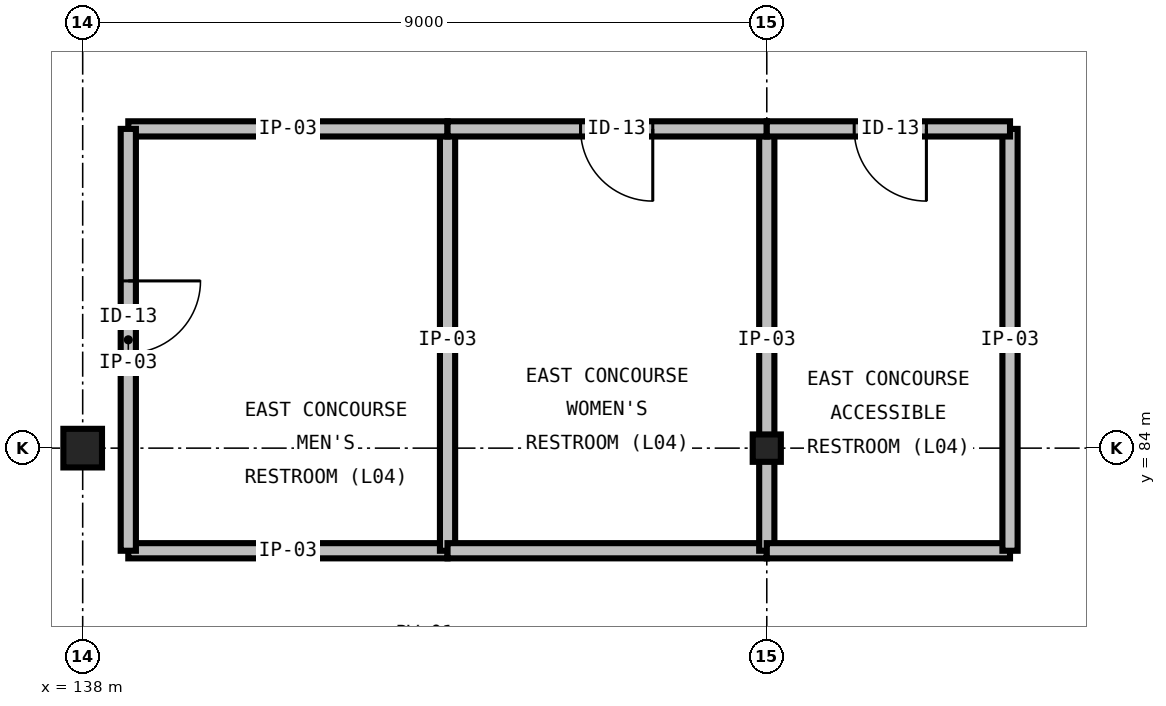
"""IFC4 building model, lengths in metres.
Left out: names, types, materials, properties, quantities, classifications, styles, units other than length and angle.
Written with IfcOpenShell. Run it as: python <this file> out.ifc"""

import sys

from ifc_helpers import new_model, si_unit, direction, frame, frame_2d, origin, origin_2d, place, context, subcontext, project, spatial, rectangle, hollow_rectangle, i_section, extrude, element, fill, save


model = new_model("IFC4")
c1 = context("Model", 3, precision=1e-05, world=origin(), true_north=direction((0.0, 1.0)))
c2 = subcontext(c1, "Body", "Model", "MODEL_VIEW")
j1 = project(units=[si_unit("LENGTHUNIT", "METRE"), si_unit("PLANEANGLEUNIT", "RADIAN")], contexts=[c1])
p1 = place(None, origin())
s1 = spatial("IfcSite", under=j1, at=p1, CompositionType="ELEMENT")
p2 = place(p1, origin())
s2 = spatial("IfcBuilding", under=s1, at=p2, CompositionType="ELEMENT")
p3 = place(p2, frame((0.0, 0.0, 23.4)))
s3 = spatial("IfcBuildingStorey", under=s2, at=p3, CompositionType="ELEMENT", Elevation=23.4)
p4 = place(p3, frame((138.0, 84.0, 0.0), z_axis=(0.0, 0.0, 1.0), x_axis=(1.0, 0.0, 0.0)))
e1 = element("IfcColumn", 1, at=p4, inside=s3, PredefinedType="COLUMN", context=c2, shape_type="SweptSolid", body=[
    extrude(hollow_rectangle(XDim=0.508, YDim=0.508, WallThickness=0.015, at=origin_2d()), origin(), (0.0, 0.0, 1.0), 3.53),
])
p5 = place(p3, frame((147.0, 84.0, 0.0), z_axis=(0.0, 0.0, 1.0), x_axis=(1.0, 0.0, 0.0)))
e2 = element("IfcColumn", 2, at=p5, inside=s3, PredefinedType="COLUMN", context=c2, shape_type="SweptSolid", body=[
    extrude(i_section(OverallWidth=0.37, OverallDepth=0.36, WebThickness=0.012, FlangeThickness=0.02, FilletRadius=0.031, at=origin_2d()), origin(), (0.0, 0.0, 1.0), 3.85),
])
p6 = place(p3, frame((138.6, 82.65, 0.0), z_axis=(0.0, 0.0, 1.0), x_axis=(1.0, 0.0, 0.0)))
e3 = element("IfcWall", 3, at=p6, inside=s3, PredefinedType="PARTITIONING", context=c2, shape_type="SweptSolid", body=[
    extrude(rectangle(XDim=4.2, YDim=0.2, at=frame_2d((2.1, 0.0))), origin(), (0.0, 0.0, 1.0), 3.53),
])
p7 = place(p3, frame((142.8, 82.65, 0.0), z_axis=(0.0, 0.0, 1.0), x_axis=(0.0, 1.0, 0.0)))
e4 = element("IfcWall", 4, at=p7, inside=s3, PredefinedType="PARTITIONING", context=c2, shape_type="SweptSolid", body=[
    extrude(rectangle(XDim=5.55, YDim=0.2, at=frame_2d((2.775, 0.0))), origin(), (0.0, 0.0, 1.0), 3.53),
])
p8 = place(p3, frame((142.8, 88.2, 0.0), z_axis=(0.0, 0.0, 1.0), x_axis=(-1.0, 0.0, 0.0)))
e5 = element("IfcWall", 5, at=p8, inside=s3, PredefinedType="PARTITIONING", context=c2, shape_type="SweptSolid", body=[
    extrude(rectangle(XDim=4.2, YDim=0.2, at=frame_2d((2.1, 0.0))), origin(), (0.0, 0.0, 1.0), 3.53),
])
p9 = place(p3, frame((138.6, 88.2, 0.0), z_axis=(0.0, 0.0, 1.0), x_axis=(0.0, -1.0, 0.0)))
e6 = element("IfcWall", 6, at=p9, inside=s3, PredefinedType="PARTITIONING", context=c2, shape_type="SweptSolid", body=[
    extrude(rectangle(XDim=5.55, YDim=0.2, at=frame_2d((2.775, 0.0))), origin(), (0.0, 0.0, 1.0), 3.53),
])
p10 = place(p9, frame((2.0, 0.0, 0.0)))
e7 = element("IfcOpeningElement", 7, at=p10, cuts=e6, PredefinedType="OPENING", context=c2, shape_type="SweptSolid", body=[
    extrude(rectangle(XDim=0.95, YDim=2.15, at=frame_2d((0.475, 1.075))), frame((0.0, 0.115, 0.0), z_axis=(0.0, -1.0, 0.0), x_axis=(1.0, 0.0, 0.0)), (0.0, 0.0, 1.0), 0.23),
])
p11 = place(p3, frame((142.8, 82.65, 0.0), z_axis=(0.0, 0.0, 1.0), x_axis=(1.0, 0.0, 0.0)))
e8 = element("IfcWall", 8, at=p11, inside=s3, PredefinedType="PARTITIONING", context=c2, shape_type="SweptSolid", body=[
    extrude(rectangle(XDim=4.2, YDim=0.2, at=frame_2d((2.1, 0.0))), origin(), (0.0, 0.0, 1.0), 3.53),
])
p12 = place(p3, frame((147.0, 82.65, 0.0), z_axis=(0.0, 0.0, 1.0), x_axis=(0.0, 1.0, 0.0)))
e9 = element("IfcWall", 9, at=p12, inside=s3, PredefinedType="PARTITIONING", context=c2, shape_type="SweptSolid", body=[
    extrude(rectangle(XDim=5.55, YDim=0.2, at=frame_2d((2.775, 0.0))), origin(), (0.0, 0.0, 1.0), 2.68),
])
p13 = place(p3, frame((147.0, 88.2, 0.0), z_axis=(0.0, 0.0, 1.0), x_axis=(-1.0, 0.0, 0.0)))
e10 = element("IfcWall", 10, at=p13, inside=s3, PredefinedType="PARTITIONING", context=c2, shape_type="SweptSolid", body=[
    extrude(rectangle(XDim=4.2, YDim=0.2, at=frame_2d((2.1, 0.0))), origin(), (0.0, 0.0, 1.0), 3.53),
])
p14 = place(p13, frame((1.5, 0.0, 0.0)))
e11 = element("IfcOpeningElement", 11, at=p14, cuts=e10, PredefinedType="OPENING", context=c2, shape_type="SweptSolid", body=[
    extrude(rectangle(XDim=0.95, YDim=2.15, at=frame_2d((0.475, 1.075))), frame((0.0, 0.115, 0.0), z_axis=(0.0, -1.0, 0.0), x_axis=(1.0, 0.0, 0.0)), (0.0, 0.0, 1.0), 0.23),
])
p15 = place(p3, frame((147.0, 82.65, 0.0), z_axis=(0.0, 0.0, 1.0), x_axis=(1.0, 0.0, 0.0)))
e12 = element("IfcWall", 12, at=p15, inside=s3, PredefinedType="PARTITIONING", context=c2, shape_type="SweptSolid", body=[
    extrude(rectangle(XDim=3.2, YDim=0.2, at=frame_2d((1.6, 0.0))), origin(), (0.0, 0.0, 1.0), 3.53),
])
p16 = place(p3, frame((150.2, 82.65, 0.0), z_axis=(0.0, 0.0, 1.0), x_axis=(0.0, 1.0, 0.0)))
e13 = element("IfcWall", 13, at=p16, inside=s3, PredefinedType="PARTITIONING", context=c2, shape_type="SweptSolid", body=[
    extrude(rectangle(XDim=5.55, YDim=0.2, at=frame_2d((2.775, 0.0))), origin(), (0.0, 0.0, 1.0), 3.53),
])
p17 = place(p3, frame((150.2, 88.2, 0.0), z_axis=(0.0, 0.0, 1.0), x_axis=(-1.0, 0.0, 0.0)))
e14 = element("IfcWall", 14, at=p17, inside=s3, PredefinedType="PARTITIONING", context=c2, shape_type="SweptSolid", body=[
    extrude(rectangle(XDim=3.2, YDim=0.2, at=frame_2d((1.6, 0.0))), origin(), (0.0, 0.0, 1.0), 3.53),
])
p18 = place(p17, frame((1.1, 0.0, 0.0)))
e15 = element("IfcOpeningElement", 15, at=p18, cuts=e14, PredefinedType="OPENING", context=c2, shape_type="SweptSolid", body=[
    extrude(rectangle(XDim=0.95, YDim=2.15, at=frame_2d((0.475, 1.075))), frame((0.0, 0.115, 0.0), z_axis=(0.0, -1.0, 0.0), x_axis=(1.0, 0.0, 0.0)), (0.0, 0.0, 1.0), 0.23),
])
p19 = place(p10, origin())
e16 = element("IfcDoor", 16, at=p19, inside=s3, OperationType="SINGLE_SWING_LEFT", PredefinedType="DOOR", context=c2, shape_type="SweptSolid", body=[
    extrude(rectangle(XDim=0.95, YDim=2.15, at=frame_2d((0.475, 1.075))), frame((0.0, 0.025, 0.0), z_axis=(0.0, -1.0, 0.0), x_axis=(1.0, 0.0, 0.0)), (0.0, 0.0, 1.0), 0.05),
])
fill(e7, e16)
p20 = place(p14, origin())
e17 = element("IfcDoor", 17, at=p20, inside=s3, OperationType="SINGLE_SWING_LEFT", PredefinedType="DOOR", context=c2, shape_type="SweptSolid", body=[
    extrude(rectangle(XDim=0.95, YDim=2.15, at=frame_2d((0.475, 1.075))), frame((0.0, 0.025, 0.0), z_axis=(0.0, -1.0, 0.0), x_axis=(1.0, 0.0, 0.0)), (0.0, 0.0, 1.0), 0.05),
])
fill(e11, e17)
p21 = place(p18, origin())
e18 = element("IfcDoor", 18, at=p21, inside=s3, OperationType="SINGLE_SWING_LEFT", PredefinedType="DOOR", context=c2, shape_type="SweptSolid", body=[
    extrude(rectangle(XDim=0.95, YDim=2.15, at=frame_2d((0.475, 1.075))), frame((0.0, 0.025, 0.0), z_axis=(0.0, -1.0, 0.0), x_axis=(1.0, 0.0, 0.0)), (0.0, 0.0, 1.0), 0.05),
])
fill(e15, e18)
save(model, sys.argv[1])
